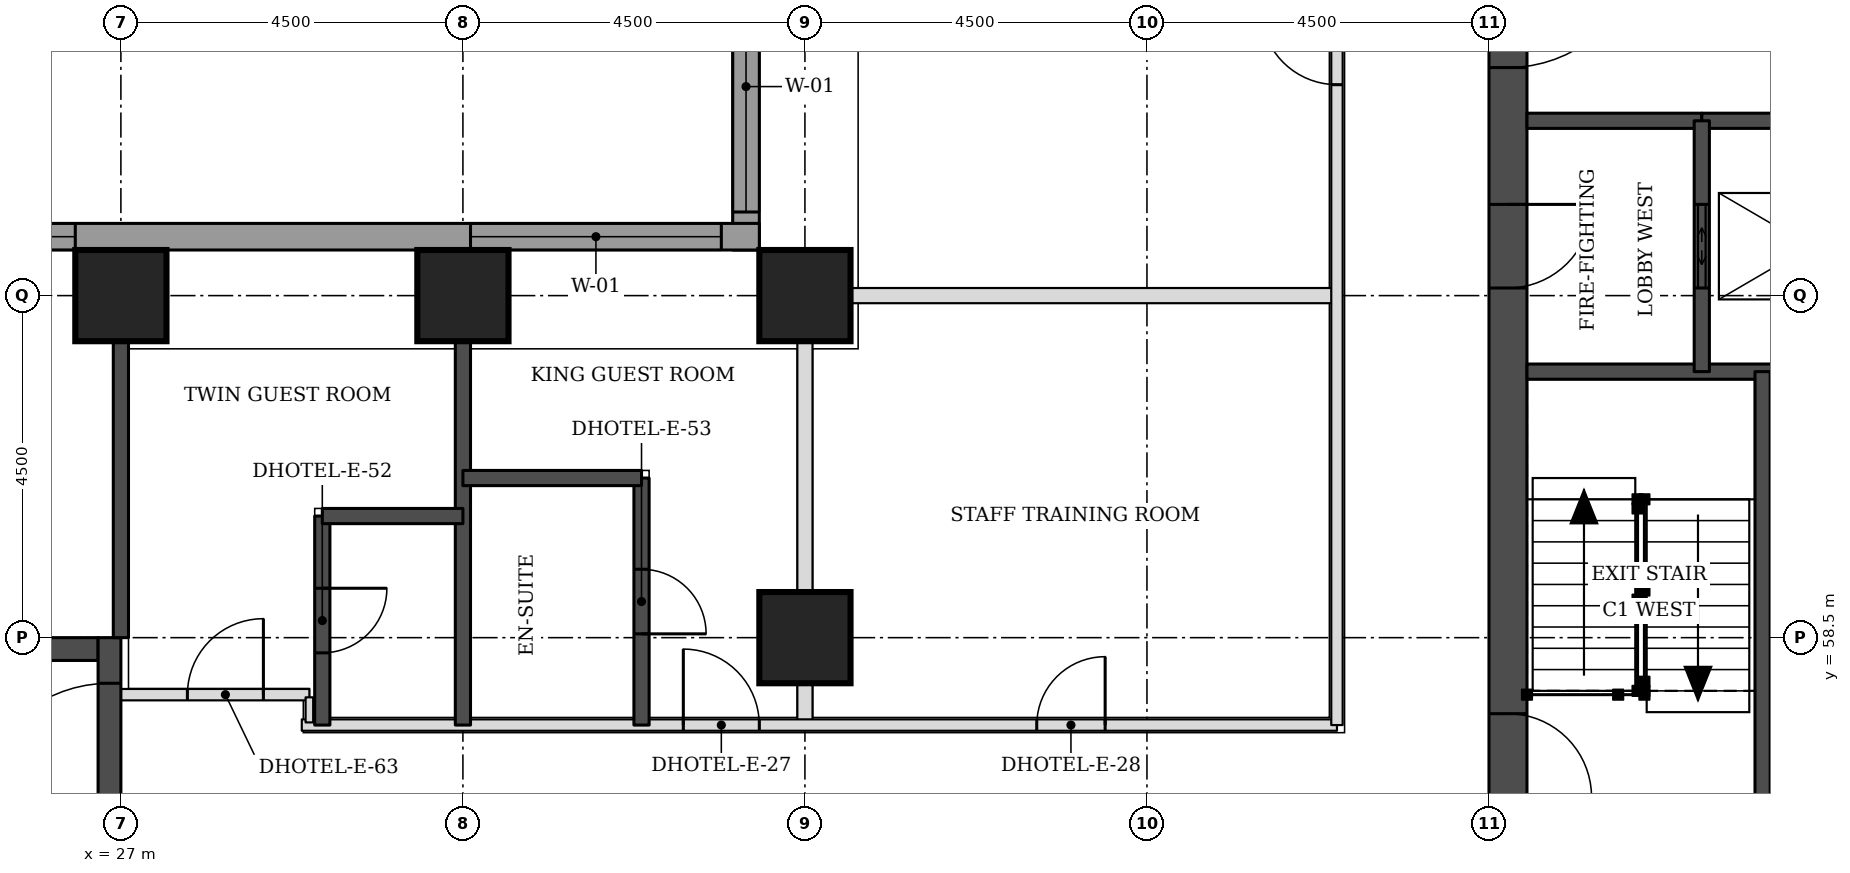
"""IFC4 building model, lengths in metres.
Left out: names, types, materials, properties, quantities, classifications, styles, units other than length and angle.
Written with IfcOpenShell. Run it as: python <this file> out.ifc"""

import sys

from ifc_helpers import new_model, si_unit, direction, frame, frame_2d, origin, origin_2d, place, context, subcontext, project, spatial, rectangle, extrude, element, fill, save


model = new_model("IFC4")
c1 = context("Model", 3, precision=1e-05, world=origin(), true_north=direction((0.0, 1.0)))
c2 = subcontext(c1, "Body", "Model", "MODEL_VIEW")
j1 = project(units=[si_unit("LENGTHUNIT", "METRE"), si_unit("PLANEANGLEUNIT", "RADIAN")], contexts=[c1])
p1 = place(None, origin())
s1 = spatial("IfcSite", under=j1, at=p1, CompositionType="ELEMENT")
p2 = place(p1, origin())
s2 = spatial("IfcBuilding", under=s1, at=p2, CompositionType="ELEMENT")
p3 = place(p2, frame((0.0, 0.0, 62.7)))
s3 = spatial("IfcBuildingStorey", under=s2, at=p3, CompositionType="ELEMENT", Elevation=62.7)
for number, where, z_axis, x_axis in (
    (1, (36.0, 58.5, 0.0), (0.0, 0.0, 1.0), (1.0, 0.0, 0.0)),
    (2, (27.0, 63.0, 0.0), (0.0, 0.0, 1.0), (1.0, 0.0, 0.0)),
    (3, (31.5, 63.0, 0.0), (0.0, 0.0, 1.0), (1.0, 0.0, 0.0)),
    (4, (36.0, 63.0, 0.0), (0.0, 0.0, 1.0), (1.0, 0.0, 0.0)),
):
    element("IfcColumn", number, at=place(p3, frame(where, z_axis=z_axis, x_axis=x_axis)), inside=s3, PredefinedType="COLUMN", context=c2, shape_type="SweptSolid", body=[
        extrude(rectangle(XDim=1.2, YDim=1.2, at=origin_2d()), origin(), (0.0, 0.0, 1.0), 3.3),
    ])
p4 = place(p3, frame((45.25, 49.5, 0.0), z_axis=(0.0, 0.0, 1.0), x_axis=(0.0, 1.0, 0.0)))
e5 = element("IfcWall", 5, at=p4, inside=s3, PredefinedType="SHEAR", context=c2, shape_type="SweptSolid", body=[
    extrude(rectangle(XDim=22.5, YDim=0.5, at=frame_2d((11.25, 0.0))), origin(), (0.0, 0.0, 1.0), 3.3),
])
p5 = place(p4, frame((4.2, 0.0, 0.0)))
e6 = element("IfcOpeningElement", 6, at=p5, cuts=e5, PredefinedType="OPENING", context=c2, shape_type="SweptSolid", body=[
    extrude(rectangle(XDim=1.8, YDim=2.1, at=frame_2d((0.9, 1.05))), frame((0.0, 0.26, 0.0), z_axis=(0.0, -1.0, 0.0), x_axis=(1.0, 0.0, 0.0)), (0.0, 0.0, 1.0), 0.52),
])
p6 = place(p4, frame((6.9, 0.0, 0.0)))
e7 = element("IfcOpeningElement", 7, at=p6, cuts=e5, PredefinedType="OPENING", context=c2, shape_type="SweptSolid", body=[
    extrude(rectangle(XDim=1.1, YDim=2.1, at=frame_2d((0.55, 1.05))), frame((0.0, 0.26, 0.0), z_axis=(0.0, -1.0, 0.0), x_axis=(1.0, 0.0, 0.0)), (0.0, 0.0, 1.0), 0.52),
])
p7 = place(p4, frame((13.6, 0.0, 0.0)))
e8 = element("IfcOpeningElement", 8, at=p7, cuts=e5, PredefinedType="OPENING", context=c2, shape_type="SweptSolid", body=[
    extrude(rectangle(XDim=1.1, YDim=2.1, at=frame_2d((0.55, 1.05))), frame((0.0, 0.26, 0.0), z_axis=(0.0, -1.0, 0.0), x_axis=(1.0, 0.0, 0.0)), (0.0, 0.0, 1.0), 0.52),
])
p8 = place(p4, frame((16.5, 0.0, 0.0)))
e9 = element("IfcOpeningElement", 9, at=p8, cuts=e5, PredefinedType="OPENING", context=c2, shape_type="SweptSolid", body=[
    extrude(rectangle(XDim=1.8, YDim=2.1, at=frame_2d((0.9, 1.05))), frame((0.0, 0.26, 0.0), z_axis=(0.0, -1.0, 0.0), x_axis=(1.0, 0.0, 0.0)), (0.0, 0.0, 1.0), 0.52),
])
p9 = place(p3, frame((18.3, 58.35, 0.0), z_axis=(0.0, 0.0, 1.0), x_axis=(1.0, 0.0, 0.0)))
e10 = element("IfcWall", 10, at=p9, inside=s3, PredefinedType="SHEAR", context=c2, shape_type="SweptSolid", body=[
    extrude(rectangle(XDim=8.4, YDim=0.3, at=frame_2d((4.2, 0.0))), origin(), (0.0, 0.0, 1.0), 3.3),
])
p10 = place(p3, frame((26.85, 49.5, 0.0), z_axis=(0.0, 0.0, 1.0), x_axis=(0.0, 1.0, 0.0)))
e11 = element("IfcWall", 11, at=p10, inside=s3, PredefinedType="SHEAR", context=c2, shape_type="SweptSolid", body=[
    extrude(rectangle(XDim=9.0, YDim=0.3, at=frame_2d((4.5, 0.0))), origin(), (0.0, 0.0, 1.0), 3.3),
])
p11 = place(p10, frame((6.6, 0.0, 0.0)))
e12 = element("IfcOpeningElement", 12, at=p11, cuts=e11, PredefinedType="OPENING", context=c2, shape_type="SweptSolid", body=[
    extrude(rectangle(XDim=1.8, YDim=2.1, at=frame_2d((0.9, 1.05))), frame((0.0, 0.16, 0.0), z_axis=(0.0, -1.0, 0.0), x_axis=(1.0, 0.0, 0.0)), (0.0, 0.0, 1.0), 0.32),
])
p12 = place(p3, frame((35.225, 76.894, 0.0), z_axis=(0.0, 0.0, 1.0), x_axis=(0.0, -1.0, 0.0)))
e13 = element("IfcWall", 13, at=p12, inside=s3, PredefinedType="STANDARD", context=c2, shape_type="SweptSolid", body=[
    extrude(rectangle(XDim=13.293, YDim=0.35, at=frame_2d((6.647, 0.0))), origin(), (0.0, 0.0, 1.0), 3.055),
])
p13 = place(p12, frame((9.493, 0.0, 0.8)))
e14 = element("IfcOpeningElement", 14, at=p13, cuts=e13, PredefinedType="OPENING", context=c2, shape_type="SweptSolid", body=[
    extrude(rectangle(XDim=3.3, YDim=1.5, at=frame_2d((1.65, 0.75))), frame((0.0, 0.185, 0.0), z_axis=(0.0, -1.0, 0.0), x_axis=(1.0, 0.0, 0.0)), (0.0, 0.0, 1.0), 0.37),
])
p14 = place(p3, frame((35.4, 63.775, 0.0), z_axis=(0.0, 0.0, 1.0), x_axis=(-1.0, 0.0, 0.0)))
e15 = element("IfcWall", 15, at=p14, inside=s3, PredefinedType="STANDARD", context=c2, shape_type="SweptSolid", body=[
    extrude(rectangle(XDim=17.793, YDim=0.35, at=frame_2d((8.897, 0.0))), origin(), (0.0, 0.0, 1.0), 3.055),
])
p15 = place(p14, frame((0.5, 0.0, 0.8)))
e16 = element("IfcOpeningElement", 16, at=p15, cuts=e15, PredefinedType="OPENING", context=c2, shape_type="SweptSolid", body=[
    extrude(rectangle(XDim=3.3, YDim=1.5, at=frame_2d((1.65, 0.75))), frame((0.0, 0.185, 0.0), z_axis=(0.0, -1.0, 0.0), x_axis=(1.0, 0.0, 0.0)), (0.0, 0.0, 1.0), 0.37),
])
p16 = place(p14, frame((9.0, 0.0, 0.8)))
e17 = element("IfcOpeningElement", 17, at=p16, cuts=e15, PredefinedType="OPENING", context=c2, shape_type="SweptSolid", body=[
    extrude(rectangle(XDim=3.3, YDim=1.5, at=frame_2d((1.65, 0.75))), frame((0.0, 0.185, 0.0), z_axis=(0.0, -1.0, 0.0), x_axis=(1.0, 0.0, 0.0)), (0.0, 0.0, 1.0), 0.37),
])
p17 = place(p3, frame((36.0, 57.35, 0.0), z_axis=(0.0, 0.0, 1.0), x_axis=(0.0, 1.0, 0.0)))
e18 = element("IfcWall", 18, at=p17, inside=s3, PredefinedType="PARTITIONING", context=c2, shape_type="SweptSolid", body=[
    extrude(rectangle(XDim=5.05, YDim=0.2, at=frame_2d((2.525, 0.0))), origin(), (0.0, 0.0, 1.0), 2.33),
])
p18 = place(p3, frame((36.6, 63.0, 0.0), z_axis=(0.0, 0.0, 1.0), x_axis=(1.0, 0.0, 0.0)))
e19 = element("IfcWall", 19, at=p18, inside=s3, PredefinedType="PARTITIONING", context=c2, shape_type="SweptSolid", body=[
    extrude(rectangle(XDim=6.4, YDim=0.2, at=frame_2d((3.2, 0.0))), origin(), (0.0, 0.0, 1.0), 3.08),
])
p19 = place(p3, frame((29.38, 57.35, 0.0), z_axis=(0.0, 0.0, 1.0), x_axis=(1.0, 0.0, 0.0)))
e20 = element("IfcWall", 20, at=p19, inside=s3, PredefinedType="PARTITIONING", context=c2, shape_type="SweptSolid", body=[
    extrude(rectangle(XDim=13.62, YDim=0.15, at=frame_2d((6.81, 0.0))), origin(), (0.0, 0.0, 1.0), 3.08),
])
p20 = place(p19, frame((5.02, 0.0, 0.0)))
e21 = element("IfcOpeningElement", 21, at=p20, cuts=e20, PredefinedType="OPENING", context=c2, shape_type="SweptSolid", body=[
    extrude(rectangle(XDim=1.0, YDim=2.1, at=frame_2d((0.5, 1.05))), frame((0.0, 0.085, 0.0), z_axis=(0.0, -1.0, 0.0), x_axis=(1.0, 0.0, 0.0)), (0.0, 0.0, 1.0), 0.17),
])
p21 = place(p19, frame((9.67, 0.0, 0.0)))
e22 = element("IfcOpeningElement", 22, at=p21, cuts=e20, PredefinedType="OPENING", context=c2, shape_type="SweptSolid", body=[
    extrude(rectangle(XDim=0.9, YDim=2.1, at=frame_2d((0.45, 1.05))), frame((0.0, 0.085, 0.0), z_axis=(0.0, -1.0, 0.0), x_axis=(1.0, 0.0, 0.0)), (0.0, 0.0, 1.0), 0.17),
])
p22 = place(p3, frame((43.0, 57.35, 0.0), z_axis=(0.0, 0.0, 1.0), x_axis=(0.0, 1.0, 0.0)))
e23 = element("IfcWall", 23, at=p22, inside=s3, PredefinedType="PARTITIONING", context=c2, shape_type="SweptSolid", body=[
    extrude(rectangle(XDim=16.65, YDim=0.15, at=frame_2d((8.325, 0.0))), origin(), (0.0, 0.0, 1.0), 3.08),
])
p23 = place(p22, frame((8.425, 0.0, 0.0)))
e24 = element("IfcOpeningElement", 24, at=p23, cuts=e23, PredefinedType="OPENING", context=c2, shape_type="SweptSolid", body=[
    extrude(rectangle(XDim=1.0, YDim=2.1, at=frame_2d((0.5, 1.05))), frame((0.0, 0.085, 0.0), z_axis=(0.0, -1.0, 0.0), x_axis=(1.0, 0.0, 0.0)), (0.0, 0.0, 1.0), 0.17),
])
p24 = place(p22, frame((15.203, 0.0, 0.0)))
e25 = element("IfcOpeningElement", 25, at=p24, cuts=e23, PredefinedType="OPENING", context=c2, shape_type="SweptSolid", body=[
    extrude(rectangle(XDim=1.0, YDim=2.1, at=frame_2d((0.5, 1.05))), frame((0.0, 0.085, 0.0), z_axis=(0.0, -1.0, 0.0), x_axis=(1.0, 0.0, 0.0)), (0.0, 0.0, 1.0), 0.17),
])
p25 = place(p3, frame((27.0, 58.5, 0.0), z_axis=(0.0, 0.0, 1.0), x_axis=(0.0, 1.0, 0.0)))
e26 = element("IfcWall", 26, at=p25, inside=s3, PredefinedType="SOLIDWALL", context=c2, shape_type="SweptSolid", body=[
    extrude(rectangle(XDim=3.9, YDim=0.2, at=frame_2d((1.95, 0.0))), origin(), (0.0, 0.0, 1.0), 3.08),
])
p26 = place(p3, frame((29.65, 57.35, 0.0), z_axis=(0.0, 0.0, 1.0), x_axis=(0.0, 1.0, 0.0)))
e27 = element("IfcWall", 27, at=p26, inside=s3, PredefinedType="SOLIDWALL", context=c2, shape_type="SweptSolid", body=[
    extrude(rectangle(XDim=2.75, YDim=0.2, at=frame_2d((1.375, 0.0))), origin(), (0.0, 0.0, 1.0), 3.08),
])
p27 = place(p26, frame((0.95, 0.0, 0.0)))
e28 = element("IfcOpeningElement", 28, at=p27, cuts=e27, PredefinedType="OPENING", context=c2, shape_type="SweptSolid", body=[
    extrude(rectangle(XDim=0.85, YDim=2.1, at=frame_2d((0.425, 1.05))), frame((0.0, 0.11, 0.0), z_axis=(0.0, -1.0, 0.0), x_axis=(1.0, 0.0, 0.0)), (0.0, 0.0, 1.0), 0.22),
])
p28 = place(p3, frame((31.5, 57.35, 0.0), z_axis=(0.0, 0.0, 1.0), x_axis=(0.0, 1.0, 0.0)))
e29 = element("IfcWall", 29, at=p28, inside=s3, PredefinedType="SOLIDWALL", context=c2, shape_type="SweptSolid", body=[
    extrude(rectangle(XDim=5.05, YDim=0.2, at=frame_2d((2.525, 0.0))), origin(), (0.0, 0.0, 1.0), 3.08),
])
p29 = place(p3, frame((33.85, 57.35, 0.0), z_axis=(0.0, 0.0, 1.0), x_axis=(0.0, 1.0, 0.0)))
e30 = element("IfcWall", 30, at=p29, inside=s3, PredefinedType="SOLIDWALL", context=c2, shape_type="SweptSolid", body=[
    extrude(rectangle(XDim=3.25, YDim=0.2, at=frame_2d((1.625, 0.0))), origin(), (0.0, 0.0, 1.0), 3.08),
])
p30 = place(p29, frame((1.2, 0.0, 0.0)))
e31 = element("IfcOpeningElement", 31, at=p30, cuts=e30, PredefinedType="OPENING", context=c2, shape_type="SweptSolid", body=[
    extrude(rectangle(XDim=0.85, YDim=2.1, at=frame_2d((0.425, 1.05))), frame((0.0, 0.11, 0.0), z_axis=(0.0, -1.0, 0.0), x_axis=(1.0, 0.0, 0.0)), (0.0, 0.0, 1.0), 0.22),
])
p31 = place(p3, frame((29.65, 60.1, 0.0), z_axis=(0.0, 0.0, 1.0), x_axis=(1.0, 0.0, 0.0)))
e32 = element("IfcWall", 32, at=p31, inside=s3, PredefinedType="SOLIDWALL", context=c2, shape_type="SweptSolid", body=[
    extrude(rectangle(XDim=1.85, YDim=0.2, at=frame_2d((0.925, 0.0))), origin(), (0.0, 0.0, 1.0), 3.08),
])
p32 = place(p3, frame((31.5, 60.6, 0.0), z_axis=(0.0, 0.0, 1.0), x_axis=(1.0, 0.0, 0.0)))
e33 = element("IfcWall", 33, at=p32, inside=s3, PredefinedType="SOLIDWALL", context=c2, shape_type="SweptSolid", body=[
    extrude(rectangle(XDim=2.35, YDim=0.2, at=frame_2d((1.175, 0.0))), origin(), (0.0, 0.0, 1.0), 3.08),
])
p33 = place(p3, frame((27.0, 57.75, 0.0), z_axis=(0.0, 0.0, 1.0), x_axis=(1.0, 0.0, 0.0)))
e34 = element("IfcWall", 34, at=p33, inside=s3, PredefinedType="PARTITIONING", context=c2, shape_type="SweptSolid", body=[
    extrude(rectangle(XDim=2.48, YDim=0.15, at=frame_2d((1.24, 0.0))), origin(), (0.0, 0.0, 1.0), 3.08),
])
p34 = place(p33, frame((0.875, 0.0, 0.0)))
e35 = element("IfcOpeningElement", 35, at=p34, cuts=e34, PredefinedType="OPENING", context=c2, shape_type="SweptSolid", body=[
    extrude(rectangle(XDim=1.0, YDim=2.1, at=frame_2d((0.5, 1.05))), frame((0.0, 0.085, 0.0), z_axis=(0.0, -1.0, 0.0), x_axis=(1.0, 0.0, 0.0)), (0.0, 0.0, 1.0), 0.17),
])
p35 = place(p3, frame((29.48, 57.385, 0.0), z_axis=(0.0, 0.0, 1.0), x_axis=(0.0, 1.0, 0.0)))
e36 = element("IfcWall", 36, at=p35, inside=s3, PredefinedType="PARTITIONING", context=c2, shape_type="SweptSolid", body=[
    extrude(rectangle(XDim=0.33, YDim=0.1, at=frame_2d((0.165, 0.0))), origin(), (0.0, 0.0, 1.0), 3.08),
])
p36 = place(p3, frame((45.5, 62.0, 0.0), z_axis=(0.0, 0.0, 1.0), x_axis=(1.0, 0.0, 0.0)))
e37 = element("IfcWall", 37, at=p36, inside=s3, PredefinedType="SOLIDWALL", context=c2, shape_type="SweptSolid", body=[
    extrude(rectangle(XDim=5.15, YDim=0.2, at=frame_2d((2.575, 0.0))), origin(), (0.0, 0.0, 1.0), 3.08),
])
p37 = place(p3, frame((45.5, 65.3, 0.0), z_axis=(0.0, 0.0, 1.0), x_axis=(1.0, 0.0, 0.0)))
e38 = element("IfcWall", 38, at=p37, inside=s3, PredefinedType="SOLIDWALL", context=c2, shape_type="SweptSolid", body=[
    extrude(rectangle(XDim=2.3, YDim=0.2, at=frame_2d((1.15, 0.0))), origin(), (0.0, 0.0, 1.0), 3.08),
])
p38 = place(p3, frame((47.8, 65.3, 0.0), z_axis=(0.0, 0.0, 1.0), x_axis=(1.0, 0.0, 0.0)))
e39 = element("IfcWall", 39, at=p38, inside=s3, PredefinedType="SOLIDWALL", context=c2, shape_type="SweptSolid", body=[
    extrude(rectangle(XDim=16.9, YDim=0.2, at=frame_2d((8.45, 0.0))), origin(), (0.0, 0.0, 1.0), 3.08),
])
p39 = place(p3, frame((47.8, 62.0, 0.0), z_axis=(0.0, 0.0, 1.0), x_axis=(0.0, 1.0, 0.0)))
e40 = element("IfcWall", 40, at=p39, inside=s3, PredefinedType="SOLIDWALL", context=c2, shape_type="SweptSolid", body=[
    extrude(rectangle(XDim=3.3, YDim=0.2, at=frame_2d((1.65, 0.0))), origin(), (0.0, 0.0, 1.0), 3.08),
])
p40 = place(p39, frame((1.1, 0.0, 0.0)))
e41 = element("IfcOpeningElement", 41, at=p40, cuts=e40, PredefinedType="OPENING", context=c2, shape_type="SweptSolid", body=[
    extrude(rectangle(XDim=1.1, YDim=2.1, at=frame_2d((0.55, 1.05))), frame((0.0, 0.11, 0.0), z_axis=(0.0, -1.0, 0.0), x_axis=(1.0, 0.0, 0.0)), (0.0, 0.0, 1.0), 0.22),
])
p41 = place(p3, frame((48.6, 56.2, 0.0), z_axis=(0.0, 0.0, 1.0), x_axis=(0.0, 1.0, 0.0)))
e42 = element("IfcWall", 42, at=p41, inside=s3, PredefinedType="SOLIDWALL", context=c2, shape_type="SweptSolid", body=[
    extrude(rectangle(XDim=5.8, YDim=0.2, at=frame_2d((2.9, 0.0))), origin(), (0.0, 0.0, 1.0), 3.08),
])
p42 = place(p13, origin())
e43 = element("IfcWindow", 43, at=p42, inside=s3, PartitioningType="SINGLE_PANEL", PredefinedType="WINDOW", context=c2, shape_type="SweptSolid", body=[
    extrude(rectangle(XDim=3.3, YDim=1.5, at=frame_2d((1.65, 0.75))), frame((0.0, 0.085, 0.0), z_axis=(0.0, -1.0, 0.0), x_axis=(1.0, 0.0, 0.0)), (0.0, 0.0, 1.0), 0.06),
])
fill(e14, e43)
p43 = place(p15, origin())
e44 = element("IfcWindow", 44, at=p43, inside=s3, PartitioningType="SINGLE_PANEL", PredefinedType="WINDOW", context=c2, shape_type="SweptSolid", body=[
    extrude(rectangle(XDim=3.3, YDim=1.5, at=frame_2d((1.65, 0.75))), frame((0.0, 0.085, 0.0), z_axis=(0.0, -1.0, 0.0), x_axis=(1.0, 0.0, 0.0)), (0.0, 0.0, 1.0), 0.06),
])
fill(e16, e44)
p44 = place(p16, origin())
e45 = element("IfcWindow", 45, at=p44, inside=s3, PartitioningType="SINGLE_PANEL", PredefinedType="WINDOW", context=c2, shape_type="SweptSolid", body=[
    extrude(rectangle(XDim=3.3, YDim=1.5, at=frame_2d((1.65, 0.75))), frame((0.0, 0.085, 0.0), z_axis=(0.0, -1.0, 0.0), x_axis=(1.0, 0.0, 0.0)), (0.0, 0.0, 1.0), 0.06),
])
fill(e17, e45)
p45 = place(p20, origin())
e46 = element("IfcDoor", 46, at=p45, inside=s3, OperationType="SINGLE_SWING_LEFT", PredefinedType="DOOR", context=c2, shape_type="SweptSolid", body=[
    extrude(rectangle(XDim=1.0, YDim=2.1, at=frame_2d((0.5, 1.05))), frame((0.0, 0.025, 0.0), z_axis=(0.0, -1.0, 0.0), x_axis=(1.0, 0.0, 0.0)), (0.0, 0.0, 1.0), 0.05),
])
fill(e21, e46)
p46 = place(p30, frame((0.85, 0.0, 0.0), z_axis=(0.0, 0.0, 1.0), x_axis=(-1.0, 0.0, 0.0)))
e47 = element("IfcDoor", 47, at=p46, inside=s3, OperationType="SINGLE_SWING_RIGHT", PredefinedType="DOOR", context=c2, shape_type="SweptSolid", body=[
    extrude(rectangle(XDim=0.85, YDim=2.1, at=frame_2d((0.425, 1.05))), frame((0.0, 0.025, 0.0), z_axis=(0.0, -1.0, 0.0), x_axis=(1.0, 0.0, 0.0)), (0.0, 0.0, 1.0), 0.05),
])
fill(e31, e47)
p47 = place(p27, frame((0.85, 0.0, 0.0), z_axis=(0.0, 0.0, 1.0), x_axis=(-1.0, 0.0, 0.0)))
e48 = element("IfcDoor", 48, at=p47, inside=s3, OperationType="SINGLE_SWING_LEFT", PredefinedType="DOOR", context=c2, shape_type="SweptSolid", body=[
    extrude(rectangle(XDim=0.85, YDim=2.1, at=frame_2d((0.425, 1.05))), frame((0.0, 0.025, 0.0), z_axis=(0.0, -1.0, 0.0), x_axis=(1.0, 0.0, 0.0)), (0.0, 0.0, 1.0), 0.05),
])
fill(e28, e48)
p48 = place(p23, origin())
e49 = element("IfcDoor", 49, at=p48, inside=s3, OperationType="SINGLE_SWING_RIGHT", PredefinedType="DOOR", context=c2, shape_type="SweptSolid", body=[
    extrude(rectangle(XDim=1.0, YDim=2.1, at=frame_2d((0.5, 1.05))), frame((0.0, 0.025, 0.0), z_axis=(0.0, -1.0, 0.0), x_axis=(1.0, 0.0, 0.0)), (0.0, 0.0, 1.0), 0.05),
])
fill(e24, e49)
p49 = place(p21, origin())
e50 = element("IfcDoor", 50, at=p49, inside=s3, OperationType="SINGLE_SWING_RIGHT", PredefinedType="DOOR", context=c2, shape_type="SweptSolid", body=[
    extrude(rectangle(XDim=0.9, YDim=2.1, at=frame_2d((0.45, 1.05))), frame((0.0, 0.025, 0.0), z_axis=(0.0, -1.0, 0.0), x_axis=(1.0, 0.0, 0.0)), (0.0, 0.0, 1.0), 0.05),
])
fill(e22, e50)
p50 = place(p34, origin())
e51 = element("IfcDoor", 51, at=p50, inside=s3, OperationType="SINGLE_SWING_RIGHT", PredefinedType="DOOR", context=c2, shape_type="SweptSolid", body=[
    extrude(rectangle(XDim=1.0, YDim=2.1, at=frame_2d((0.5, 1.05))), frame((0.0, 0.025, 0.0), z_axis=(0.0, -1.0, 0.0), x_axis=(1.0, 0.0, 0.0)), (0.0, 0.0, 1.0), 0.05),
])
fill(e35, e51)
p51 = place(p40, origin())
e52 = element("IfcDoor", 52, at=p51, inside=s3, OperationType="DOUBLE_DOOR_SLIDING", PredefinedType="DOOR", context=c2, shape_type="SweptSolid", body=[
    extrude(rectangle(XDim=1.1, YDim=2.1, at=frame_2d((0.55, 1.05))), frame((0.0, 0.025, 0.0), z_axis=(0.0, -1.0, 0.0), x_axis=(1.0, 0.0, 0.0)), (0.0, 0.0, 1.0), 0.05),
])
fill(e41, e52)
p52 = place(p6, frame((1.1, 0.0, 0.0), z_axis=(0.0, 0.0, 1.0), x_axis=(-1.0, 0.0, 0.0)))
e53 = element("IfcDoor", 53, at=p52, inside=s3, OperationType="SINGLE_SWING_RIGHT", PredefinedType="DOOR", context=c2, shape_type="SweptSolid", body=[
    extrude(rectangle(XDim=1.1, YDim=2.1, at=frame_2d((0.55, 1.05))), frame((0.0, 0.025, 0.0), z_axis=(0.0, -1.0, 0.0), x_axis=(1.0, 0.0, 0.0)), (0.0, 0.0, 1.0), 0.05),
])
fill(e7, e53)
p53 = place(p7, frame((1.1, 0.0, 0.0), z_axis=(0.0, 0.0, 1.0), x_axis=(-1.0, 0.0, 0.0)))
e54 = element("IfcDoor", 54, at=p53, inside=s3, OperationType="SINGLE_SWING_LEFT", PredefinedType="DOOR", context=c2, shape_type="SweptSolid", body=[
    extrude(rectangle(XDim=1.1, YDim=2.1, at=frame_2d((0.55, 1.05))), frame((0.0, 0.025, 0.0), z_axis=(0.0, -1.0, 0.0), x_axis=(1.0, 0.0, 0.0)), (0.0, 0.0, 1.0), 0.05),
])
fill(e8, e54)
p54 = place(p8, frame((1.8, 0.0, 0.0), z_axis=(0.0, 0.0, 1.0), x_axis=(-1.0, 0.0, 0.0)))
e55 = element("IfcDoor", 55, at=p54, inside=s3, OperationType="SINGLE_SWING_LEFT", PredefinedType="DOOR", context=c2, shape_type="SweptSolid", body=[
    extrude(rectangle(XDim=1.8, YDim=2.1, at=frame_2d((0.9, 1.05))), frame((0.0, 0.025, 0.0), z_axis=(0.0, -1.0, 0.0), x_axis=(1.0, 0.0, 0.0)), (0.0, 0.0, 1.0), 0.05),
])
fill(e9, e55)
p55 = place(p11, origin())
e56 = element("IfcDoor", 56, at=p55, inside=s3, OperationType="SINGLE_SWING_LEFT", PredefinedType="DOOR", context=c2, shape_type="SweptSolid", body=[
    extrude(rectangle(XDim=1.8, YDim=2.1, at=frame_2d((0.9, 1.05))), frame((0.0, 0.025, 0.0), z_axis=(0.0, -1.0, 0.0), x_axis=(1.0, 0.0, 0.0)), (0.0, 0.0, 1.0), 0.05),
])
fill(e12, e56)
save(model, sys.argv[1])
